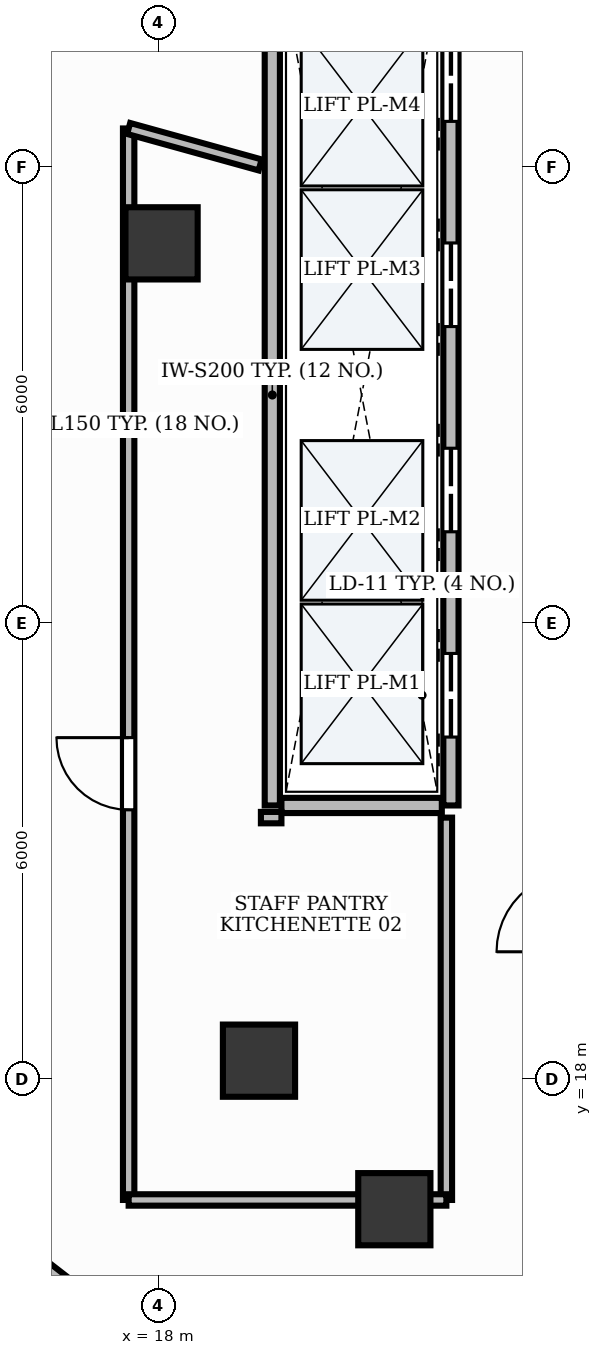
"""IFC4 building model, lengths in metres.
Left out: names, types, materials, properties, quantities, classifications, styles, units other than length and angle.
Written with IfcOpenShell. Run it as: python <this file> out.ifc"""

import sys

from ifc_helpers import new_model, si_unit, direction, frame, frame_2d, origin, origin_2d, place, context, subcontext, project, spatial, rectangle, extrude, element, fill, save


model = new_model("IFC4")
c1 = context("Model", 3, precision=1e-05, world=origin(), true_north=direction((0.0, 1.0)))
c2 = subcontext(c1, "Body", "Model", "MODEL_VIEW")
j1 = project(units=[si_unit("LENGTHUNIT", "METRE"), si_unit("PLANEANGLEUNIT", "RADIAN")], contexts=[c1])
p1 = place(None, origin())
s1 = spatial("IfcSite", under=j1, at=p1, CompositionType="ELEMENT")
p2 = place(p1, origin())
s2 = spatial("IfcBuilding", under=s1, at=p2, CompositionType="ELEMENT")
p3 = place(p2, frame((0.0, 0.0, 208.8)))
s3 = spatial("IfcBuildingStorey", under=s2, at=p3, CompositionType="ELEMENT", Elevation=208.8)
for number, where, z_axis, x_axis in (
    (1, (18.043, 28.995, -0.0), (0.0, 0.0, 1.0), (1.0, 0.0, 0.0)),
    (2, (19.325, 18.242, -0.0), (0.0, 0.0, 1.0), (1.0, 0.0, 0.0)),
    (3, (21.105, 16.288, -0.0), (0.0, 0.0, 1.0), (1.0, 0.0, 0.0)),
):
    element("IfcColumn", number, at=place(p3, frame(where, z_axis=z_axis, x_axis=x_axis)), inside=s3, PredefinedType="COLUMN", context=c2, shape_type="SweptSolid", body=[
        extrude(rectangle(XDim=0.95, YDim=0.95, at=origin_2d()), origin(), (0.0, 0.0, 1.0), 3.881),
    ])
p4 = place(p3, frame((19.5, 21.6, 0.0), z_axis=(0.0, 0.0, 1.0), x_axis=(0.0, 1.0, 0.0)))
e4 = element("IfcWall", 4, at=p4, inside=s3, PredefinedType="PARTITIONING", context=c2, shape_type="SweptSolid", body=[
    extrude(rectangle(XDim=10.8, YDim=0.2, at=frame_2d((5.4, 0.0))), origin(), (0.0, 0.0, 1.0), 2.22),
])
p5 = place(p3, frame((21.85, 21.6, 0.0), z_axis=(0.0, 0.0, 1.0), x_axis=(0.0, 1.0, 0.0)))
e5 = element("IfcWall", 5, at=p5, inside=s3, PredefinedType="PARTITIONING", context=c2, shape_type="SweptSolid", body=[
    extrude(rectangle(XDim=10.8, YDim=0.2, at=frame_2d((5.4, 0.0))), origin(), (0.0, 0.0, 1.0), 2.22),
])
p6 = place(p5, frame((0.9, 0.0, 0.0)))
e6 = element("IfcOpeningElement", 6, at=p6, cuts=e5, PredefinedType="OPENING", context=c2, shape_type="SweptSolid", body=[
    extrude(rectangle(XDim=1.1, YDim=2.2, at=frame_2d((0.55, 1.1))), frame((0.0, 0.115, 0.0), z_axis=(0.0, -1.0, 0.0), x_axis=(1.0, 0.0, 0.0)), (0.0, 0.0, 1.0), 0.23),
])
p7 = place(p5, frame((3.6, 0.0, 0.0)))
e7 = element("IfcOpeningElement", 7, at=p7, cuts=e5, PredefinedType="OPENING", context=c2, shape_type="SweptSolid", body=[
    extrude(rectangle(XDim=1.1, YDim=2.2, at=frame_2d((0.55, 1.1))), frame((0.0, 0.115, 0.0), z_axis=(0.0, -1.0, 0.0), x_axis=(1.0, 0.0, 0.0)), (0.0, 0.0, 1.0), 0.23),
])
p8 = place(p5, frame((6.3, 0.0, 0.0)))
e8 = element("IfcOpeningElement", 8, at=p8, cuts=e5, PredefinedType="OPENING", context=c2, shape_type="SweptSolid", body=[
    extrude(rectangle(XDim=1.1, YDim=2.2, at=frame_2d((0.55, 1.1))), frame((0.0, 0.115, 0.0), z_axis=(0.0, -1.0, 0.0), x_axis=(1.0, 0.0, 0.0)), (0.0, 0.0, 1.0), 0.23),
])
p9 = place(p5, frame((9.0, 0.0, 0.0)))
e9 = element("IfcOpeningElement", 9, at=p9, cuts=e5, PredefinedType="OPENING", context=c2, shape_type="SweptSolid", body=[
    extrude(rectangle(XDim=1.1, YDim=2.2, at=frame_2d((0.55, 1.1))), frame((0.0, 0.115, 0.0), z_axis=(0.0, -1.0, 0.0), x_axis=(1.0, 0.0, 0.0)), (0.0, 0.0, 1.0), 0.23),
])
p10 = place(p3, frame((19.62, 21.6, 0.0), z_axis=(0.0, 0.0, 1.0), x_axis=(1.0, 0.0, 0.0)))
e10 = element("IfcWall", 10, at=p10, inside=s3, PredefinedType="PARTITIONING", context=c2, shape_type="SweptSolid", body=[
    extrude(rectangle(XDim=2.11, YDim=0.2, at=frame_2d((1.055, 0.0))), origin(), (0.0, 0.0, 1.0), 2.22),
])
p11 = place(p3, frame((17.61, 16.41, 0.0), z_axis=(0.0, 0.0, 1.0), x_axis=(0.0, 1.0, 0.0)))
e11 = element("IfcWall", 11, at=p11, inside=s3, PredefinedType="PARTITIONING", context=c2, shape_type="SweptSolid", body=[
    extrude(rectangle(XDim=14.096, YDim=0.15, at=frame_2d((7.048, 0.0))), origin(), (0.0, 0.0, 1.0), 2.22),
])
p12 = place(p11, frame((5.132, 0.0, 0.0)))
e12 = element("IfcOpeningElement", 12, at=p12, cuts=e11, PredefinedType="OPENING", context=c2, shape_type="SweptSolid", body=[
    extrude(rectangle(XDim=0.95, YDim=2.15, at=frame_2d((0.475, 1.075))), frame((0.0, 0.09, 0.0), z_axis=(0.0, -1.0, 0.0), x_axis=(1.0, 0.0, 0.0)), (0.0, 0.0, 1.0), 0.18),
])
p13 = place(p3, frame((19.35, 21.44, 0.0), z_axis=(0.0, 0.0, 1.0), x_axis=(1.0, 0.0, 0.0)))
e13 = element("IfcWall", 13, at=p13, inside=s3, PredefinedType="PARTITIONING", context=c2, shape_type="SweptSolid", body=[
    extrude(rectangle(XDim=0.27, YDim=0.15, at=frame_2d((0.135, 0.0))), origin(), (0.0, 0.0, 1.0), 2.22),
])
p14 = place(p3, frame((21.79, 21.44, 0.0), z_axis=(0.0, 0.0, 1.0), x_axis=(0.0, -1.0, 0.0)))
e14 = element("IfcWall", 14, at=p14, inside=s3, PredefinedType="PARTITIONING", context=c2, shape_type="SweptSolid", body=[
    extrude(rectangle(XDim=5.03, YDim=0.15, at=frame_2d((2.515, 0.0))), origin(), (0.0, 0.0, 1.0), 2.22),
])
p15 = place(p3, frame((21.79, 16.41, 0.0), z_axis=(0.0, 0.0, 1.0), x_axis=(-1.0, 0.0, 0.0)))
e15 = element("IfcWall", 15, at=p15, inside=s3, PredefinedType="PARTITIONING", context=c2, shape_type="SweptSolid", body=[
    extrude(rectangle(XDim=4.18, YDim=0.15, at=frame_2d((2.09, 0.0))), origin(), (0.0, 0.0, 1.0), 2.22),
])
p16 = place(p3, frame((17.61, 30.506, 0.0), z_axis=(0.0, 0.0, 1.0), x_axis=(0.963625002939, -0.267258028338, 0.0)))
e16 = element("IfcWall", 16, at=p16, inside=s3, PredefinedType="PARTITIONING", context=c2, shape_type="SweptSolid", body=[
    extrude(rectangle(XDim=1.795, YDim=0.15, at=frame_2d((0.897, 0.0))), origin(), (0.0, 0.0, 1.0), 2.22),
])
p17 = place(p3, frame((16.544, 15.498, 0.0), z_axis=(0.0, 0.0, 1.0), x_axis=(0.790342017468, -0.612665892167, 0.0)))
e17 = element("IfcWall", 17, at=p17, inside=s3, PredefinedType="PARTITIONING", context=c2, shape_type="SweptSolid", body=[
    extrude(rectangle(XDim=2.428, YDim=0.16, at=frame_2d((1.214, 0.0))), origin(), (0.0, 0.0, 1.0), 2.22),
])
p18 = place(p6, origin())
e18 = element("IfcDoor", 18, at=p18, inside=s3, OperationType="DOUBLE_DOOR_SLIDING", PredefinedType="DOOR", context=c2, shape_type="SweptSolid", body=[
    extrude(rectangle(XDim=1.1, YDim=2.2, at=frame_2d((0.55, 1.1))), frame((0.0, 0.025, 0.0), z_axis=(0.0, -1.0, 0.0), x_axis=(1.0, 0.0, 0.0)), (0.0, 0.0, 1.0), 0.05),
])
fill(e6, e18)
p19 = place(p7, origin())
e19 = element("IfcDoor", 19, at=p19, inside=s3, OperationType="DOUBLE_DOOR_SLIDING", PredefinedType="DOOR", context=c2, shape_type="SweptSolid", body=[
    extrude(rectangle(XDim=1.1, YDim=2.2, at=frame_2d((0.55, 1.1))), frame((0.0, 0.025, 0.0), z_axis=(0.0, -1.0, 0.0), x_axis=(1.0, 0.0, 0.0)), (0.0, 0.0, 1.0), 0.05),
])
fill(e7, e19)
p20 = place(p8, origin())
e20 = element("IfcDoor", 20, at=p20, inside=s3, OperationType="DOUBLE_DOOR_SLIDING", PredefinedType="DOOR", context=c2, shape_type="SweptSolid", body=[
    extrude(rectangle(XDim=1.1, YDim=2.2, at=frame_2d((0.55, 1.1))), frame((0.0, 0.025, 0.0), z_axis=(0.0, -1.0, 0.0), x_axis=(1.0, 0.0, 0.0)), (0.0, 0.0, 1.0), 0.05),
])
fill(e8, e20)
p21 = place(p9, origin())
e21 = element("IfcDoor", 21, at=p21, inside=s3, OperationType="DOUBLE_DOOR_SLIDING", PredefinedType="DOOR", context=c2, shape_type="SweptSolid", body=[
    extrude(rectangle(XDim=1.1, YDim=2.2, at=frame_2d((0.55, 1.1))), frame((0.0, 0.025, 0.0), z_axis=(0.0, -1.0, 0.0), x_axis=(1.0, 0.0, 0.0)), (0.0, 0.0, 1.0), 0.05),
])
fill(e9, e21)
p22 = place(p12, origin())
e22 = element("IfcDoor", 22, at=p22, inside=s3, OperationType="SINGLE_SWING_RIGHT", PredefinedType="DOOR", context=c2, shape_type="SweptSolid", body=[
    extrude(rectangle(XDim=0.95, YDim=2.15, at=frame_2d((0.475, 1.075))), frame((0.0, 0.025, 0.0), z_axis=(0.0, -1.0, 0.0), x_axis=(1.0, 0.0, 0.0)), (0.0, 0.0, 1.0), 0.05),
])
fill(e12, e22)
save(model, sys.argv[1])
